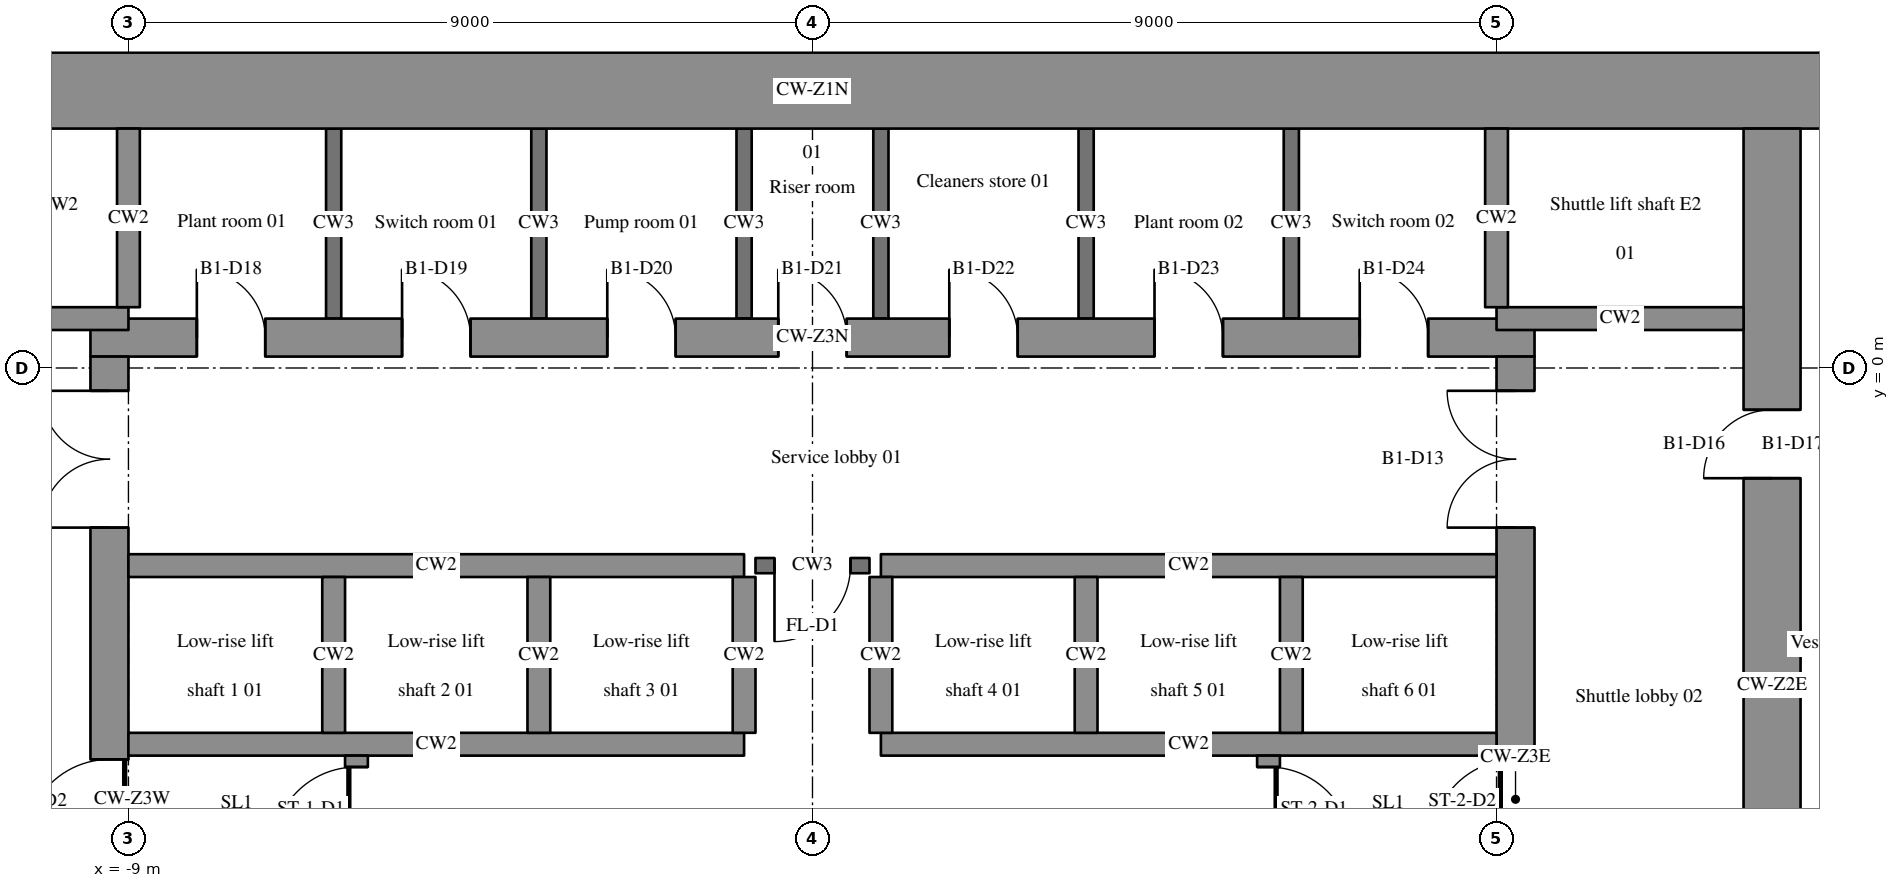
"""IFC4 building model, lengths in metres.
Left out: names, types, materials, properties, quantities, classifications, styles, units other than length and angle.
Written with IfcOpenShell. Run it as: python <this file> out.ifc"""

import sys

from ifc_helpers import new_model, si_unit, direction, frame, frame_2d, origin, place, context, subcontext, project, spatial, rectangle, extrude, element, fill, save


model = new_model("IFC4")
c1 = context("Model", 3, precision=1e-05, world=origin(), true_north=direction((0.0, 1.0)))
c2 = subcontext(c1, "Body", "Model", "MODEL_VIEW")
j1 = project(units=[si_unit("LENGTHUNIT", "METRE"), si_unit("PLANEANGLEUNIT", "RADIAN")], contexts=[c1])
p1 = place(None, origin())
s1 = spatial("IfcSite", under=j1, at=p1, CompositionType="ELEMENT")
p2 = place(p1, origin())
s2 = spatial("IfcBuilding", under=s1, at=p2, CompositionType="ELEMENT")
p3 = place(p2, frame((0.0, 0.0, -5.0)))
s3 = spatial("IfcBuildingStorey", under=s2, at=p3, CompositionType="ELEMENT", Elevation=-5.0)
p4 = place(p3, frame((-15.0, 3.65, -0.25), z_axis=(0.0, 0.0, 1.0), x_axis=(1.0, 0.0, 0.0)))
e1 = element("IfcWall", 1, at=p4, inside=s3, PredefinedType="SHEAR", context=c2, shape_type="SweptSolid", body=[
    extrude(rectangle(XDim=30.0, YDim=1.0, at=frame_2d((15.0, 0.0))), origin(), (0.0, 0.0, 1.0), 5.25),
])
p5 = place(p3, frame((12.625, -11.5, -0.25), z_axis=(0.0, 0.0, 1.0), x_axis=(0.0, 1.0, 0.0)))
e2 = element("IfcWall", 2, at=p5, inside=s3, PredefinedType="SHEAR", context=c2, shape_type="SweptSolid", body=[
    extrude(rectangle(XDim=14.65, YDim=0.75, at=frame_2d((7.325, 0.0))), origin(), (0.0, 0.0, 1.0), 5.25),
])
p6 = place(p5, frame((10.05, 0.0, 0.0)))
e3 = element("IfcOpeningElement", 3, at=p6, cuts=e2, PredefinedType="OPENING", context=c2, shape_type="SweptSolid", body=[
    extrude(rectangle(XDim=0.9, YDim=2.1, at=frame_2d((0.45, 1.05))), frame((0.0, 0.385, 0.0), z_axis=(0.0, -1.0, 0.0), x_axis=(1.0, 0.0, 0.0)), (0.0, 0.0, 1.0), 0.77),
])
p7 = place(p3, frame((-9.5, 0.4, -0.25), z_axis=(0.0, 0.0, 1.0), x_axis=(1.0, 0.0, 0.0)))
e4 = element("IfcWall", 4, at=p7, inside=s3, PredefinedType="SHEAR", context=c2, shape_type="SweptSolid", body=[
    extrude(rectangle(XDim=19.0, YDim=0.5, at=frame_2d((9.5, 0.0))), origin(), (0.0, 0.0, 1.0), 5.25),
])
p8 = place(p7, frame((1.4, 0.0, 0.0)))
e5 = element("IfcOpeningElement", 5, at=p8, cuts=e4, PredefinedType="OPENING", context=c2, shape_type="SweptSolid", body=[
    extrude(rectangle(XDim=0.9, YDim=2.1, at=frame_2d((0.45, 1.05))), frame((0.0, 0.26, 0.0), z_axis=(0.0, -1.0, 0.0), x_axis=(1.0, 0.0, 0.0)), (0.0, 0.0, 1.0), 0.52),
])
p9 = place(p7, frame((4.1, 0.0, 0.0)))
e6 = element("IfcOpeningElement", 6, at=p9, cuts=e4, PredefinedType="OPENING", context=c2, shape_type="SweptSolid", body=[
    extrude(rectangle(XDim=0.9, YDim=2.1, at=frame_2d((0.45, 1.05))), frame((0.0, 0.26, 0.0), z_axis=(0.0, -1.0, 0.0), x_axis=(1.0, 0.0, 0.0)), (0.0, 0.0, 1.0), 0.52),
])
p10 = place(p7, frame((6.8, 0.0, 0.0)))
e7 = element("IfcOpeningElement", 7, at=p10, cuts=e4, PredefinedType="OPENING", context=c2, shape_type="SweptSolid", body=[
    extrude(rectangle(XDim=0.9, YDim=2.1, at=frame_2d((0.45, 1.05))), frame((0.0, 0.26, 0.0), z_axis=(0.0, -1.0, 0.0), x_axis=(1.0, 0.0, 0.0)), (0.0, 0.0, 1.0), 0.52),
])
p11 = place(p7, frame((11.3, 0.0, 0.0)))
e8 = element("IfcOpeningElement", 8, at=p11, cuts=e4, PredefinedType="OPENING", context=c2, shape_type="SweptSolid", body=[
    extrude(rectangle(XDim=0.9, YDim=2.1, at=frame_2d((0.45, 1.05))), frame((0.0, 0.26, 0.0), z_axis=(0.0, -1.0, 0.0), x_axis=(1.0, 0.0, 0.0)), (0.0, 0.0, 1.0), 0.52),
])
p12 = place(p7, frame((14.0, 0.0, 0.0)))
e9 = element("IfcOpeningElement", 9, at=p12, cuts=e4, PredefinedType="OPENING", context=c2, shape_type="SweptSolid", body=[
    extrude(rectangle(XDim=0.9, YDim=2.1, at=frame_2d((0.45, 1.05))), frame((0.0, 0.26, 0.0), z_axis=(0.0, -1.0, 0.0), x_axis=(1.0, 0.0, 0.0)), (0.0, 0.0, 1.0), 0.52),
])
p13 = place(p7, frame((16.7, 0.0, 0.0)))
e10 = element("IfcOpeningElement", 10, at=p13, cuts=e4, PredefinedType="OPENING", context=c2, shape_type="SweptSolid", body=[
    extrude(rectangle(XDim=0.9, YDim=2.1, at=frame_2d((0.45, 1.05))), frame((0.0, 0.26, 0.0), z_axis=(0.0, -1.0, 0.0), x_axis=(1.0, 0.0, 0.0)), (0.0, 0.0, 1.0), 0.52),
])
p14 = place(p7, frame((9.05, 0.0, 0.0)))
e11 = element("IfcOpeningElement", 11, at=p14, cuts=e4, PredefinedType="OPENING", context=c2, shape_type="SweptSolid", body=[
    extrude(rectangle(XDim=0.9, YDim=2.1, at=frame_2d((0.45, 1.05))), frame((0.0, 0.26, 0.0), z_axis=(0.0, -1.0, 0.0), x_axis=(1.0, 0.0, 0.0)), (0.0, 0.0, 1.0), 0.52),
])
p15 = place(p3, frame((-9.25, -11.5, -0.25), z_axis=(0.0, 0.0, 1.0), x_axis=(0.0, 1.0, 0.0)))
e12 = element("IfcWall", 12, at=p15, inside=s3, PredefinedType="SHEAR", context=c2, shape_type="SweptSolid", body=[
    extrude(rectangle(XDim=11.65, YDim=0.5, at=frame_2d((5.825, 0.0))), origin(), (0.0, 0.0, 1.0), 5.25),
])
p16 = place(p15, frame((9.4, 0.0, 0.0)))
e13 = element("IfcOpeningElement", 13, at=p16, cuts=e12, PredefinedType="OPENING", context=c2, shape_type="SweptSolid", body=[
    extrude(rectangle(XDim=1.8, YDim=2.1, at=frame_2d((0.9, 1.05))), frame((0.0, 0.26, 0.0), z_axis=(0.0, -1.0, 0.0), x_axis=(1.0, 0.0, 0.0)), (0.0, 0.0, 1.0), 0.52),
])
p17 = place(p15, frame((5.25, 0.0, 0.0)))
e14 = element("IfcOpeningElement", 14, at=p17, cuts=e12, PredefinedType="OPENING", context=c2, shape_type="SweptSolid", body=[
    extrude(rectangle(XDim=1.1, YDim=2.1, at=frame_2d((0.55, 1.05))), frame((0.0, 0.26, 0.0), z_axis=(0.0, -1.0, 0.0), x_axis=(1.0, 0.0, 0.0)), (0.0, 0.0, 1.0), 0.52),
])
p18 = place(p3, frame((9.25, -11.5, -0.25), z_axis=(0.0, 0.0, 1.0), x_axis=(0.0, 1.0, 0.0)))
e15 = element("IfcWall", 15, at=p18, inside=s3, PredefinedType="SHEAR", context=c2, shape_type="SweptSolid", body=[
    extrude(rectangle(XDim=11.65, YDim=0.5, at=frame_2d((5.825, 0.0))), origin(), (0.0, 0.0, 1.0), 5.25),
])
p19 = place(p18, frame((9.4, 0.0, 0.0)))
e16 = element("IfcOpeningElement", 16, at=p19, cuts=e15, PredefinedType="OPENING", context=c2, shape_type="SweptSolid", body=[
    extrude(rectangle(XDim=1.8, YDim=2.1, at=frame_2d((0.9, 1.05))), frame((0.0, 0.26, 0.0), z_axis=(0.0, -1.0, 0.0), x_axis=(1.0, 0.0, 0.0)), (0.0, 0.0, 1.0), 0.52),
])
p20 = place(p18, frame((5.25, 0.0, 0.0)))
e17 = element("IfcOpeningElement", 17, at=p20, cuts=e15, PredefinedType="OPENING", context=c2, shape_type="SweptSolid", body=[
    extrude(rectangle(XDim=1.1, YDim=2.1, at=frame_2d((0.55, 1.05))), frame((0.0, 0.26, 0.0), z_axis=(0.0, -1.0, 0.0), x_axis=(1.0, 0.0, 0.0)), (0.0, 0.0, 1.0), 0.52),
])
for number, where, z_axis, x_axis in (
    (18, (-9.0, -4.95, 0.0), (0.0, 0.0, 1.0), (1.0, 0.0, 0.0)),
    (19, (0.9, -4.95, 0.0), (0.0, 0.0, 1.0), (1.0, 0.0, 0.0)),
    (20, (-9.0, -2.6, 0.0), (0.0, 0.0, 1.0), (1.0, 0.0, 0.0)),
):
    element("IfcWall", number, at=place(p3, frame(where, z_axis=z_axis, x_axis=x_axis)), inside=s3, PredefinedType="SHEAR", context=c2, shape_type="SweptSolid", body=[
        extrude(rectangle(XDim=8.1, YDim=0.3, at=frame_2d((4.05, 0.0))), origin(), (0.0, 0.0, 1.0), 5.0),
    ])
p21 = place(p3, frame((0.75, -2.6, 0.0), z_axis=(0.0, 0.0, 1.0), x_axis=(-1.0, 0.0, 0.0)))
e21 = element("IfcWall", 21, at=p21, inside=s3, PredefinedType="SOLIDWALL", context=c2, shape_type="SweptSolid", body=[
    extrude(rectangle(XDim=1.5, YDim=0.2, at=frame_2d((0.75, 0.0))), origin(), (0.0, 0.0, 1.0), 4.7),
])
p22 = place(p21, frame((0.25, 0.0, 0.0)))
e22 = element("IfcOpeningElement", 22, at=p22, cuts=e21, PredefinedType="OPENING", context=c2, shape_type="SweptSolid", body=[
    extrude(rectangle(XDim=1.0, YDim=2.1, at=frame_2d((0.5, 1.05))), frame((0.0, 0.11, 0.0), z_axis=(0.0, -1.0, 0.0), x_axis=(1.0, 0.0, 0.0)), (0.0, 0.0, 1.0), 0.22),
])
p23 = place(p3, frame((0.9, -2.6, 0.0), z_axis=(0.0, 0.0, 1.0), x_axis=(1.0, 0.0, 0.0)))
e23 = element("IfcWall", 23, at=p23, inside=s3, PredefinedType="SHEAR", context=c2, shape_type="SweptSolid", body=[
    extrude(rectangle(XDim=8.1, YDim=0.3, at=frame_2d((4.05, 0.0))), origin(), (0.0, 0.0, 1.0), 5.0),
])
for number, where, z_axis, x_axis in (
    (24, (-9.0, 0.65, 0.0), (0.0, 0.0, 1.0), (-1.0, 0.0, 0.0)),
    (25, (12.25, 0.65, 0.0), (0.0, 0.0, 1.0), (-1.0, 0.0, 0.0)),
):
    element("IfcWall", number, at=place(p3, frame(where, z_axis=z_axis, x_axis=x_axis)), inside=s3, PredefinedType="SHEAR", context=c2, shape_type="SweptSolid", body=[
        extrude(rectangle(XDim=3.25, YDim=0.3, at=frame_2d((1.625, 0.0))), origin(), (0.0, 0.0, 1.0), 5.0),
    ])
p24 = place(p3, frame((-9.0, 0.8, 0.0), z_axis=(0.0, 0.0, 1.0), x_axis=(0.0, 1.0, 0.0)))
e26 = element("IfcWall", 26, at=p24, inside=s3, PredefinedType="SHEAR", context=c2, shape_type="SweptSolid", body=[
    extrude(rectangle(XDim=2.35, YDim=0.3, at=frame_2d((1.175, 0.0))), origin(), (0.0, 0.0, 1.0), 5.0),
])
p25 = place(p3, frame((-6.3, -4.8, 0.0), z_axis=(0.0, 0.0, 1.0), x_axis=(0.0, 1.0, 0.0)))
e27 = element("IfcWall", 27, at=p25, inside=s3, PredefinedType="SHEAR", context=c2, shape_type="SweptSolid", body=[
    extrude(rectangle(XDim=2.05, YDim=0.3, at=frame_2d((1.025, 0.0))), origin(), (0.0, 0.0, 1.0), 5.0),
])
p26 = place(p3, frame((-6.3, 0.65, 0.0), z_axis=(0.0, 0.0, 1.0), x_axis=(0.0, 1.0, 0.0)))
e28 = element("IfcWall", 28, at=p26, inside=s3, PredefinedType="SOLIDWALL", context=c2, shape_type="SweptSolid", body=[
    extrude(rectangle(XDim=2.5, YDim=0.2, at=frame_2d((1.25, 0.0))), origin(), (0.0, 0.0, 1.0), 4.7),
])
p27 = place(p3, frame((-6.0, -11.5, 0.0), z_axis=(0.0, 0.0, 1.0), x_axis=(0.0, 1.0, 0.0)))
e29 = element("IfcWall", 29, at=p27, inside=s3, PredefinedType="SHEAR", context=c2, shape_type="SweptSolid", body=[
    extrude(rectangle(XDim=6.4, YDim=0.3, at=frame_2d((3.2, 0.0))), origin(), (0.0, 0.0, 1.0), 5.0),
])
p28 = place(p27, frame((5.15, 0.0, 0.0)))
e30 = element("IfcOpeningElement", 30, at=p28, cuts=e29, PredefinedType="OPENING", context=c2, shape_type="SweptSolid", body=[
    extrude(rectangle(XDim=1.1, YDim=2.1, at=frame_2d((0.55, 1.05))), frame((0.0, 0.16, 0.0), z_axis=(0.0, -1.0, 0.0), x_axis=(1.0, 0.0, 0.0)), (0.0, 0.0, 1.0), 0.32),
])
p29 = place(p3, frame((-3.6, -4.8, 0.0), z_axis=(0.0, 0.0, 1.0), x_axis=(0.0, 1.0, 0.0)))
e31 = element("IfcWall", 31, at=p29, inside=s3, PredefinedType="SHEAR", context=c2, shape_type="SweptSolid", body=[
    extrude(rectangle(XDim=2.05, YDim=0.3, at=frame_2d((1.025, 0.0))), origin(), (0.0, 0.0, 1.0), 5.0),
])
p30 = place(p3, frame((-3.6, 0.65, 0.0), z_axis=(0.0, 0.0, 1.0), x_axis=(0.0, 1.0, 0.0)))
e32 = element("IfcWall", 32, at=p30, inside=s3, PredefinedType="SOLIDWALL", context=c2, shape_type="SweptSolid", body=[
    extrude(rectangle(XDim=2.5, YDim=0.2, at=frame_2d((1.25, 0.0))), origin(), (0.0, 0.0, 1.0), 4.7),
])
p31 = place(p3, frame((-0.9, -4.8, 0.0), z_axis=(0.0, 0.0, 1.0), x_axis=(0.0, 1.0, 0.0)))
e33 = element("IfcWall", 33, at=p31, inside=s3, PredefinedType="SHEAR", context=c2, shape_type="SweptSolid", body=[
    extrude(rectangle(XDim=2.05, YDim=0.3, at=frame_2d((1.025, 0.0))), origin(), (0.0, 0.0, 1.0), 5.0),
])
p32 = place(p3, frame((-0.9, 0.65, 0.0), z_axis=(0.0, 0.0, 1.0), x_axis=(0.0, 1.0, 0.0)))
e34 = element("IfcWall", 34, at=p32, inside=s3, PredefinedType="SOLIDWALL", context=c2, shape_type="SweptSolid", body=[
    extrude(rectangle(XDim=2.5, YDim=0.2, at=frame_2d((1.25, 0.0))), origin(), (0.0, 0.0, 1.0), 4.7),
])
p33 = place(p3, frame((0.9, -4.8, 0.0), z_axis=(0.0, 0.0, 1.0), x_axis=(0.0, 1.0, 0.0)))
e35 = element("IfcWall", 35, at=p33, inside=s3, PredefinedType="SHEAR", context=c2, shape_type="SweptSolid", body=[
    extrude(rectangle(XDim=2.05, YDim=0.3, at=frame_2d((1.025, 0.0))), origin(), (0.0, 0.0, 1.0), 5.0),
])
p34 = place(p3, frame((0.9, 0.65, 0.0), z_axis=(0.0, 0.0, 1.0), x_axis=(0.0, 1.0, 0.0)))
e36 = element("IfcWall", 36, at=p34, inside=s3, PredefinedType="SOLIDWALL", context=c2, shape_type="SweptSolid", body=[
    extrude(rectangle(XDim=2.5, YDim=0.2, at=frame_2d((1.25, 0.0))), origin(), (0.0, 0.0, 1.0), 4.7),
])
p35 = place(p3, frame((3.6, -4.8, 0.0), z_axis=(0.0, 0.0, 1.0), x_axis=(0.0, 1.0, 0.0)))
e37 = element("IfcWall", 37, at=p35, inside=s3, PredefinedType="SHEAR", context=c2, shape_type="SweptSolid", body=[
    extrude(rectangle(XDim=2.05, YDim=0.3, at=frame_2d((1.025, 0.0))), origin(), (0.0, 0.0, 1.0), 5.0),
])
p36 = place(p3, frame((3.6, 0.65, 0.0), z_axis=(0.0, 0.0, 1.0), x_axis=(0.0, 1.0, 0.0)))
e38 = element("IfcWall", 38, at=p36, inside=s3, PredefinedType="SOLIDWALL", context=c2, shape_type="SweptSolid", body=[
    extrude(rectangle(XDim=2.5, YDim=0.2, at=frame_2d((1.25, 0.0))), origin(), (0.0, 0.0, 1.0), 4.7),
])
p37 = place(p3, frame((6.0, -5.1, 0.0), z_axis=(0.0, 0.0, 1.0), x_axis=(0.0, -1.0, 0.0)))
e39 = element("IfcWall", 39, at=p37, inside=s3, PredefinedType="SHEAR", context=c2, shape_type="SweptSolid", body=[
    extrude(rectangle(XDim=6.4, YDim=0.3, at=frame_2d((3.2, 0.0))), origin(), (0.0, 0.0, 1.0), 5.0),
])
p38 = place(p37, frame((0.15, 0.0, 0.0)))
e40 = element("IfcOpeningElement", 40, at=p38, cuts=e39, PredefinedType="OPENING", context=c2, shape_type="SweptSolid", body=[
    extrude(rectangle(XDim=1.1, YDim=2.1, at=frame_2d((0.55, 1.05))), frame((0.0, 0.16, 0.0), z_axis=(0.0, -1.0, 0.0), x_axis=(1.0, 0.0, 0.0)), (0.0, 0.0, 1.0), 0.32),
])
p39 = place(p3, frame((6.3, -4.8, 0.0), z_axis=(0.0, 0.0, 1.0), x_axis=(0.0, 1.0, 0.0)))
e41 = element("IfcWall", 41, at=p39, inside=s3, PredefinedType="SHEAR", context=c2, shape_type="SweptSolid", body=[
    extrude(rectangle(XDim=2.05, YDim=0.3, at=frame_2d((1.025, 0.0))), origin(), (0.0, 0.0, 1.0), 5.0),
])
p40 = place(p3, frame((6.3, 0.65, 0.0), z_axis=(0.0, 0.0, 1.0), x_axis=(0.0, 1.0, 0.0)))
e42 = element("IfcWall", 42, at=p40, inside=s3, PredefinedType="SOLIDWALL", context=c2, shape_type="SweptSolid", body=[
    extrude(rectangle(XDim=2.5, YDim=0.2, at=frame_2d((1.25, 0.0))), origin(), (0.0, 0.0, 1.0), 4.7),
])
p41 = place(p3, frame((9.0, 0.8, 0.0), z_axis=(0.0, 0.0, 1.0), x_axis=(0.0, 1.0, 0.0)))
e43 = element("IfcWall", 43, at=p41, inside=s3, PredefinedType="SHEAR", context=c2, shape_type="SweptSolid", body=[
    extrude(rectangle(XDim=2.35, YDim=0.3, at=frame_2d((1.175, 0.0))), origin(), (0.0, 0.0, 1.0), 5.0),
])
p42 = place(p19, origin())
e44 = element("IfcDoor", 44, at=p42, inside=s3, OperationType="DOUBLE_DOOR_SINGLE_SWING", PredefinedType="DOOR", context=c2, shape_type="SweptSolid", body=[
    extrude(rectangle(XDim=1.8, YDim=2.1, at=frame_2d((0.9, 1.05))), frame((0.0, 0.025, 0.0), z_axis=(0.0, -1.0, 0.0), x_axis=(1.0, 0.0, 0.0)), (0.0, 0.0, 1.0), 0.05),
])
fill(e16, e44)
p43 = place(p16, origin())
e45 = element("IfcDoor", 45, at=p43, inside=s3, OperationType="DOUBLE_DOOR_SINGLE_SWING", PredefinedType="DOOR", context=c2, shape_type="SweptSolid", body=[
    extrude(rectangle(XDim=1.8, YDim=2.1, at=frame_2d((0.9, 1.05))), frame((0.0, 0.025, 0.0), z_axis=(0.0, -1.0, 0.0), x_axis=(1.0, 0.0, 0.0)), (0.0, 0.0, 1.0), 0.05),
])
fill(e13, e45)
p44 = place(p22, origin())
e46 = element("IfcDoor", 46, at=p44, inside=s3, OperationType="SINGLE_SWING_RIGHT", PredefinedType="DOOR", context=c2, shape_type="SweptSolid", body=[
    extrude(rectangle(XDim=1.0, YDim=2.1, at=frame_2d((0.5, 1.05))), frame((0.0, 0.025, 0.0), z_axis=(0.0, -1.0, 0.0), x_axis=(1.0, 0.0, 0.0)), (0.0, 0.0, 1.0), 0.05),
])
fill(e22, e46)
p45 = place(p28, origin())
e47 = element("IfcDoor", 47, at=p45, inside=s3, OperationType="SINGLE_SWING_LEFT", PredefinedType="DOOR", context=c2, shape_type="SweptSolid", body=[
    extrude(rectangle(XDim=1.1, YDim=2.1, at=frame_2d((0.55, 1.05))), frame((0.0, 0.025, 0.0), z_axis=(0.0, -1.0, 0.0), x_axis=(1.0, 0.0, 0.0)), (0.0, 0.0, 1.0), 0.05),
])
fill(e30, e47)
p46 = place(p17, origin())
e48 = element("IfcDoor", 48, at=p46, inside=s3, OperationType="SINGLE_SWING_LEFT", PredefinedType="DOOR", context=c2, shape_type="SweptSolid", body=[
    extrude(rectangle(XDim=1.1, YDim=2.1, at=frame_2d((0.55, 1.05))), frame((0.0, 0.025, 0.0), z_axis=(0.0, -1.0, 0.0), x_axis=(1.0, 0.0, 0.0)), (0.0, 0.0, 1.0), 0.05),
])
fill(e14, e48)
p47 = place(p38, origin())
e49 = element("IfcDoor", 49, at=p47, inside=s3, OperationType="SINGLE_SWING_RIGHT", PredefinedType="DOOR", context=c2, shape_type="SweptSolid", body=[
    extrude(rectangle(XDim=1.1, YDim=2.1, at=frame_2d((0.55, 1.05))), frame((0.0, 0.025, 0.0), z_axis=(0.0, -1.0, 0.0), x_axis=(1.0, 0.0, 0.0)), (0.0, 0.0, 1.0), 0.05),
])
fill(e40, e49)
p48 = place(p20, origin())
e50 = element("IfcDoor", 50, at=p48, inside=s3, OperationType="SINGLE_SWING_LEFT", PredefinedType="DOOR", context=c2, shape_type="SweptSolid", body=[
    extrude(rectangle(XDim=1.1, YDim=2.1, at=frame_2d((0.55, 1.05))), frame((0.0, 0.025, 0.0), z_axis=(0.0, -1.0, 0.0), x_axis=(1.0, 0.0, 0.0)), (0.0, 0.0, 1.0), 0.05),
])
fill(e17, e50)
p49 = place(p8, origin())
e51 = element("IfcDoor", 51, at=p49, inside=s3, OperationType="SINGLE_SWING_LEFT", PredefinedType="DOOR", context=c2, shape_type="SweptSolid", body=[
    extrude(rectangle(XDim=0.9, YDim=2.1, at=frame_2d((0.45, 1.05))), frame((0.0, 0.025, 0.0), z_axis=(0.0, -1.0, 0.0), x_axis=(1.0, 0.0, 0.0)), (0.0, 0.0, 1.0), 0.05),
])
fill(e5, e51)
p50 = place(p9, origin())
e52 = element("IfcDoor", 52, at=p50, inside=s3, OperationType="SINGLE_SWING_LEFT", PredefinedType="DOOR", context=c2, shape_type="SweptSolid", body=[
    extrude(rectangle(XDim=0.9, YDim=2.1, at=frame_2d((0.45, 1.05))), frame((0.0, 0.025, 0.0), z_axis=(0.0, -1.0, 0.0), x_axis=(1.0, 0.0, 0.0)), (0.0, 0.0, 1.0), 0.05),
])
fill(e6, e52)
p51 = place(p10, origin())
e53 = element("IfcDoor", 53, at=p51, inside=s3, OperationType="SINGLE_SWING_LEFT", PredefinedType="DOOR", context=c2, shape_type="SweptSolid", body=[
    extrude(rectangle(XDim=0.9, YDim=2.1, at=frame_2d((0.45, 1.05))), frame((0.0, 0.025, 0.0), z_axis=(0.0, -1.0, 0.0), x_axis=(1.0, 0.0, 0.0)), (0.0, 0.0, 1.0), 0.05),
])
fill(e7, e53)
p52 = place(p11, origin())
e54 = element("IfcDoor", 54, at=p52, inside=s3, OperationType="SINGLE_SWING_LEFT", PredefinedType="DOOR", context=c2, shape_type="SweptSolid", body=[
    extrude(rectangle(XDim=0.9, YDim=2.1, at=frame_2d((0.45, 1.05))), frame((0.0, 0.025, 0.0), z_axis=(0.0, -1.0, 0.0), x_axis=(1.0, 0.0, 0.0)), (0.0, 0.0, 1.0), 0.05),
])
fill(e8, e54)
p53 = place(p12, origin())
e55 = element("IfcDoor", 55, at=p53, inside=s3, OperationType="SINGLE_SWING_LEFT", PredefinedType="DOOR", context=c2, shape_type="SweptSolid", body=[
    extrude(rectangle(XDim=0.9, YDim=2.1, at=frame_2d((0.45, 1.05))), frame((0.0, 0.025, 0.0), z_axis=(0.0, -1.0, 0.0), x_axis=(1.0, 0.0, 0.0)), (0.0, 0.0, 1.0), 0.05),
])
fill(e9, e55)
p54 = place(p13, origin())
e56 = element("IfcDoor", 56, at=p54, inside=s3, OperationType="SINGLE_SWING_LEFT", PredefinedType="DOOR", context=c2, shape_type="SweptSolid", body=[
    extrude(rectangle(XDim=0.9, YDim=2.1, at=frame_2d((0.45, 1.05))), frame((0.0, 0.025, 0.0), z_axis=(0.0, -1.0, 0.0), x_axis=(1.0, 0.0, 0.0)), (0.0, 0.0, 1.0), 0.05),
])
fill(e10, e56)
p55 = place(p14, origin())
e57 = element("IfcDoor", 57, at=p55, inside=s3, OperationType="SINGLE_SWING_LEFT", PredefinedType="DOOR", context=c2, shape_type="SweptSolid", body=[
    extrude(rectangle(XDim=0.9, YDim=2.1, at=frame_2d((0.45, 1.05))), frame((0.0, 0.025, 0.0), z_axis=(0.0, -1.0, 0.0), x_axis=(1.0, 0.0, 0.0)), (0.0, 0.0, 1.0), 0.05),
])
fill(e11, e57)
p56 = place(p6, origin())
e58 = element("IfcDoor", 58, at=p56, inside=s3, OperationType="SINGLE_SWING_LEFT", PredefinedType="DOOR", context=c2, shape_type="SweptSolid", body=[
    extrude(rectangle(XDim=0.9, YDim=2.1, at=frame_2d((0.45, 1.05))), frame((0.0, 0.025, 0.0), z_axis=(0.0, -1.0, 0.0), x_axis=(1.0, 0.0, 0.0)), (0.0, 0.0, 1.0), 0.05),
])
fill(e3, e58)
save(model, sys.argv[1])
